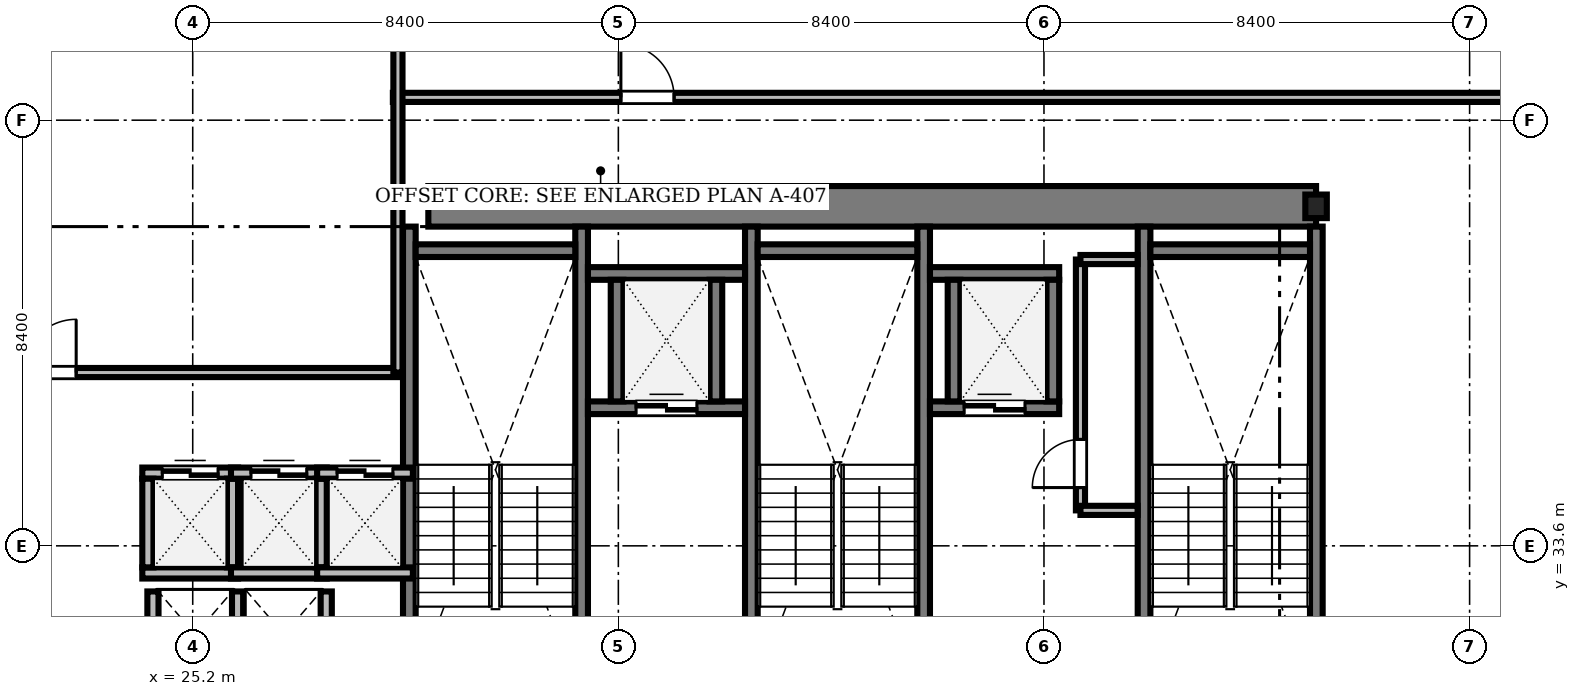
"""IFC4 building model, lengths in metres.
Left out: names, types, materials, properties, quantities, classifications, styles, units other than length and angle.
Written with IfcOpenShell. Run it as: python <this file> out.ifc"""

import sys

from ifc_helpers import new_model, si_unit, direction, frame, frame_2d, origin, origin_2d, place, context, subcontext, project, spatial, rectangle, i_section, extrude, source, transform, mapped, element, fill, save


model = new_model("IFC4")
c1 = context("Model", 3, precision=1e-05, world=origin(), true_north=direction((0.0, 1.0)))
c2 = subcontext(c1, "Body", "Model", "MODEL_VIEW")
j1 = project(units=[si_unit("LENGTHUNIT", "METRE"), si_unit("PLANEANGLEUNIT", "RADIAN")], contexts=[c1])
p1 = place(None, origin())
s1 = spatial("IfcSite", under=j1, at=p1, CompositionType="ELEMENT")
p2 = place(p1, origin())
s2 = spatial("IfcBuilding", under=s1, at=p2, CompositionType="ELEMENT")
p3 = place(p2, frame((0.0, 0.0, 144.6)))
s3 = spatial("IfcBuildingStorey", under=s2, at=p3, CompositionType="ELEMENT", Elevation=144.6)
m1 = source(origin(), c2, "Body", "SweptSolid", [
    extrude(rectangle(XDim=17.52, YDim=0.8, at=frame_2d((8.76, 0.0))), origin(), (0.0, 0.0, 1.0), 3.46),
])
p4 = place(p3, frame((29.85, 40.3, 0.0), z_axis=(0.0, 0.0, 1.0), x_axis=(1.0, 0.0, 0.0)))
e1 = element("IfcWall", 1, at=p4, inside=s3, PredefinedType="SHEAR", context=c2, shape_type="MappedRepresentation", body=[
    mapped(m1, transform((0.0, 0.0, 0.0), scale=1.0)),
])
m2 = source(origin(), c2, "Body", "SweptSolid", [
    extrude(i_section(OverallWidth=0.424, OverallDepth=0.465, WebThickness=0.035, FlangeThickness=0.056, FilletRadius=0.015, at=origin_2d()), origin(), (0.0, 0.0, 1.0), 3.46),
])
p5 = place(p3, frame((47.37, 40.3, 0.0), z_axis=(0.0, 0.0, 1.0), x_axis=(1.0, 0.0, 0.0)))
e2 = element("IfcColumn", 2, at=p5, inside=s3, PredefinedType="COLUMN", context=c2, shape_type="MappedRepresentation", body=[
    mapped(m2, transform((0.0, 0.0, 0.0), scale=1.0)),
])
m3 = source(origin(), c2, "Body", "SweptSolid", [
    extrude(rectangle(XDim=9.25, YDim=0.25, at=frame_2d((4.625, 0.0))), origin(), (0.0, 0.0, 1.0), 3.5),
])
for number, where, z_axis, x_axis in (
    (3, (29.475, 30.65, 0.0), (0.0, 0.0, 1.0), (0.0, 1.0, 0.0)),
    (4, (32.875, 30.65, 0.0), (0.0, 0.0, 1.0), (0.0, 1.0, 0.0)),
):
    element("IfcWall", number, at=place(p3, frame(where, z_axis=z_axis, x_axis=x_axis)), inside=s3, PredefinedType="SOLIDWALL", context=c2, shape_type="MappedRepresentation", body=[
        mapped(m3, transform((0.0, 0.0, 0.0), scale=1.0)),
    ])
m4 = source(origin(), c2, "Body", "SweptSolid", [
    extrude(rectangle(XDim=3.15, YDim=0.25, at=frame_2d((1.575, 0.0))), origin(), (0.0, 0.0, 1.0), 3.5),
])
p6 = place(p3, frame((29.6, 39.425, 0.0), z_axis=(0.0, 0.0, 1.0), x_axis=(1.0, 0.0, 0.0)))
e5 = element("IfcWall", 5, at=p6, inside=s3, PredefinedType="SOLIDWALL", context=c2, shape_type="MappedRepresentation", body=[
    mapped(m4, transform((0.0, 0.0, 0.0), scale=1.0)),
])
for number, where, z_axis, x_axis in (
    (6, (36.225, 30.65, 0.0), (0.0, 0.0, 1.0), (0.0, 1.0, 0.0)),
    (7, (39.625, 30.65, 0.0), (0.0, 0.0, 1.0), (0.0, 1.0, 0.0)),
):
    element("IfcWall", number, at=place(p3, frame(where, z_axis=z_axis, x_axis=x_axis)), inside=s3, PredefinedType="SOLIDWALL", context=c2, shape_type="MappedRepresentation", body=[
        mapped(m3, transform((0.0, 0.0, 0.0), scale=1.0)),
    ])
p7 = place(p3, frame((36.35, 39.425, 0.0), z_axis=(0.0, 0.0, 1.0), x_axis=(1.0, 0.0, 0.0)))
e8 = element("IfcWall", 8, at=p7, inside=s3, PredefinedType="SOLIDWALL", context=c2, shape_type="MappedRepresentation", body=[
    mapped(m4, transform((0.0, 0.0, 0.0), scale=1.0)),
])
for number, where, z_axis, x_axis in (
    (9, (43.975, 30.65, 0.0), (0.0, 0.0, 1.0), (0.0, 1.0, 0.0)),
    (10, (47.375, 30.65, 0.0), (0.0, 0.0, 1.0), (0.0, 1.0, 0.0)),
):
    element("IfcWall", number, at=place(p3, frame(where, z_axis=z_axis, x_axis=x_axis)), inside=s3, PredefinedType="SOLIDWALL", context=c2, shape_type="MappedRepresentation", body=[
        mapped(m3, transform((0.0, 0.0, 0.0), scale=1.0)),
    ])
p8 = place(p3, frame((44.1, 39.425, 0.0), z_axis=(0.0, 0.0, 1.0), x_axis=(1.0, 0.0, 0.0)))
e11 = element("IfcWall", 11, at=p8, inside=s3, PredefinedType="SOLIDWALL", context=c2, shape_type="MappedRepresentation", body=[
    mapped(m4, transform((0.0, 0.0, 0.0), scale=1.0)),
])
m5 = source(origin(), c2, "Body", "SweptSolid", [
    extrude(rectangle(XDim=1.89, YDim=0.22, at=frame_2d((0.945, 0.0))), origin(), (0.0, 0.0, 1.0), 3.46),
])
p9 = place(p3, frame((24.205, 33.065, 0.0), z_axis=(0.0, 0.0, 1.0), x_axis=(1.0, 0.0, 0.0)))
e12 = element("IfcWall", 12, at=p9, inside=s3, PredefinedType="SOLIDWALL", context=c2, shape_type="MappedRepresentation", body=[
    mapped(m5, transform((0.0, 0.0, 0.0), scale=1.0)),
])
p10 = place(p3, frame((24.205, 35.035, 0.0), z_axis=(0.0, 0.0, 1.0), x_axis=(1.0, 0.0, 0.0)))
e13 = element("IfcWall", 13, at=p10, inside=s3, PredefinedType="SOLIDWALL", context=c2, shape_type="MappedRepresentation", body=[
    mapped(m5, transform((0.0, 0.0, 0.0), scale=1.0)),
])
m6 = source(origin(), c2, "Body", "SweptSolid", [
    extrude(rectangle(XDim=1.1, YDim=2.2, at=frame_2d((0.55, 1.1))), frame((0.0, 0.12, 0.0), z_axis=(0.0, -1.0, 0.0), x_axis=(1.0, 0.0, 0.0)), (0.0, 0.0, 1.0), 0.24),
])
p11 = place(p10, frame((0.395, 0.0, 0.0)))
e14 = element("IfcOpeningElement", 14, at=p11, cuts=e13, PredefinedType="OPENING", context=c2, shape_type="MappedRepresentation", body=[
    mapped(m6, transform((0.0, 0.0, 0.0), scale=1.0)),
])
m7 = source(origin(), c2, "Body", "SweptSolid", [
    extrude(rectangle(XDim=1.75, YDim=0.22, at=frame_2d((0.875, 0.0))), origin(), (0.0, 0.0, 1.0), 3.46),
])
for number, where, z_axis, x_axis in (
    (15, (24.315, 33.175, 0.0), (0.0, 0.0, 1.0), (0.0, 1.0, 0.0)),
    (16, (25.985, 33.175, 0.0), (0.0, 0.0, 1.0), (0.0, 1.0, 0.0)),
):
    element("IfcWall", number, at=place(p3, frame(where, z_axis=z_axis, x_axis=x_axis)), inside=s3, PredefinedType="SOLIDWALL", context=c2, shape_type="MappedRepresentation", body=[
        mapped(m7, transform((0.0, 0.0, 0.0), scale=1.0)),
    ])
p12 = place(p3, frame((25.955, 33.065, 0.0), z_axis=(0.0, 0.0, 1.0), x_axis=(1.0, 0.0, 0.0)))
e17 = element("IfcWall", 17, at=p12, inside=s3, PredefinedType="SOLIDWALL", context=c2, shape_type="MappedRepresentation", body=[
    mapped(m5, transform((0.0, 0.0, 0.0), scale=1.0)),
])
p13 = place(p3, frame((25.955, 35.035, 0.0), z_axis=(0.0, 0.0, 1.0), x_axis=(1.0, 0.0, 0.0)))
e18 = element("IfcWall", 18, at=p13, inside=s3, PredefinedType="SOLIDWALL", context=c2, shape_type="MappedRepresentation", body=[
    mapped(m5, transform((0.0, 0.0, 0.0), scale=1.0)),
])
p14 = place(p13, frame((0.395, 0.0, 0.0)))
e19 = element("IfcOpeningElement", 19, at=p14, cuts=e18, PredefinedType="OPENING", context=c2, shape_type="MappedRepresentation", body=[
    mapped(m6, transform((0.0, 0.0, 0.0), scale=1.0)),
])
p15 = place(p3, frame((27.735, 33.175, 0.0), z_axis=(0.0, 0.0, 1.0), x_axis=(0.0, 1.0, 0.0)))
e20 = element("IfcWall", 20, at=p15, inside=s3, PredefinedType="SOLIDWALL", context=c2, shape_type="MappedRepresentation", body=[
    mapped(m7, transform((0.0, 0.0, 0.0), scale=1.0)),
])
p16 = place(p3, frame((27.655, 33.065, 0.0), z_axis=(0.0, 0.0, 1.0), x_axis=(1.0, 0.0, 0.0)))
e21 = element("IfcWall", 21, at=p16, inside=s3, PredefinedType="SOLIDWALL", context=c2, shape_type="MappedRepresentation", body=[
    mapped(m5, transform((0.0, 0.0, 0.0), scale=1.0)),
])
p17 = place(p3, frame((27.655, 35.035, 0.0), z_axis=(0.0, 0.0, 1.0), x_axis=(1.0, 0.0, 0.0)))
e22 = element("IfcWall", 22, at=p17, inside=s3, PredefinedType="SOLIDWALL", context=c2, shape_type="MappedRepresentation", body=[
    mapped(m5, transform((0.0, 0.0, 0.0), scale=1.0)),
])
p18 = place(p17, frame((0.395, 0.0, 0.0)))
e23 = element("IfcOpeningElement", 23, at=p18, cuts=e22, PredefinedType="OPENING", context=c2, shape_type="MappedRepresentation", body=[
    mapped(m6, transform((0.0, 0.0, 0.0), scale=1.0)),
])
m8 = source(origin(), c2, "Body", "SweptSolid", [
    extrude(rectangle(XDim=3.1, YDim=0.25, at=frame_2d((1.55, 0.0))), origin(), (0.0, 0.0, 1.0), 3.46),
])
p19 = place(p3, frame((33.0, 36.325, 0.0), z_axis=(0.0, 0.0, 1.0), x_axis=(1.0, 0.0, 0.0)))
e24 = element("IfcWall", 24, at=p19, inside=s3, PredefinedType="SOLIDWALL", context=c2, shape_type="MappedRepresentation", body=[
    mapped(m8, transform((0.0, 0.0, 0.0), scale=1.0)),
])
m9 = source(origin(), c2, "Body", "SweptSolid", [
    extrude(rectangle(XDim=1.2, YDim=2.25, at=frame_2d((0.6, 1.125))), frame((0.0, 0.135, 0.0), z_axis=(0.0, -1.0, 0.0), x_axis=(1.0, 0.0, 0.0)), (0.0, 0.0, 1.0), 0.27),
])
p20 = place(p19, frame((0.95, 0.0, 0.0)))
e25 = element("IfcOpeningElement", 25, at=p20, cuts=e24, PredefinedType="OPENING", context=c2, shape_type="MappedRepresentation", body=[
    mapped(m9, transform((0.0, 0.0, 0.0), scale=1.0)),
])
p21 = place(p3, frame((33.0, 38.975, 0.0), z_axis=(0.0, 0.0, 1.0), x_axis=(1.0, 0.0, 0.0)))
e26 = element("IfcWall", 26, at=p21, inside=s3, PredefinedType="SOLIDWALL", context=c2, shape_type="MappedRepresentation", body=[
    mapped(m8, transform((0.0, 0.0, 0.0), scale=1.0)),
])
m10 = source(origin(), c2, "Body", "SweptSolid", [
    extrude(rectangle(XDim=2.4, YDim=0.25, at=frame_2d((1.2, 0.0))), origin(), (0.0, 0.0, 1.0), 3.46),
])
for number, where, z_axis, x_axis in (
    (27, (33.575, 36.45, 0.0), (0.0, 0.0, 1.0), (0.0, 1.0, 0.0)),
    (28, (35.525, 36.45, 0.0), (0.0, 0.0, 1.0), (0.0, 1.0, 0.0)),
):
    element("IfcWall", number, at=place(p3, frame(where, z_axis=z_axis, x_axis=x_axis)), inside=s3, PredefinedType="SOLIDWALL", context=c2, shape_type="MappedRepresentation", body=[
        mapped(m10, transform((0.0, 0.0, 0.0), scale=1.0)),
    ])
m11 = source(origin(), c2, "Body", "SweptSolid", [
    extrude(rectangle(XDim=2.55, YDim=0.25, at=frame_2d((1.275, 0.0))), origin(), (0.0, 0.0, 1.0), 3.46),
])
p22 = place(p3, frame((39.75, 36.325, 0.0), z_axis=(0.0, 0.0, 1.0), x_axis=(1.0, 0.0, 0.0)))
e29 = element("IfcWall", 29, at=p22, inside=s3, PredefinedType="SOLIDWALL", context=c2, shape_type="MappedRepresentation", body=[
    mapped(m11, transform((0.0, 0.0, 0.0), scale=1.0)),
])
p23 = place(p22, frame((0.675, 0.0, 0.0)))
e30 = element("IfcOpeningElement", 30, at=p23, cuts=e29, PredefinedType="OPENING", context=c2, shape_type="MappedRepresentation", body=[
    mapped(m9, transform((0.0, 0.0, 0.0), scale=1.0)),
])
p24 = place(p3, frame((39.75, 38.975, 0.0), z_axis=(0.0, 0.0, 1.0), x_axis=(1.0, 0.0, 0.0)))
e31 = element("IfcWall", 31, at=p24, inside=s3, PredefinedType="SOLIDWALL", context=c2, shape_type="MappedRepresentation", body=[
    mapped(m11, transform((0.0, 0.0, 0.0), scale=1.0)),
])
for number, where, z_axis, x_axis in (
    (32, (40.225, 36.45, 0.0), (0.0, 0.0, 1.0), (0.0, 1.0, 0.0)),
    (33, (42.175, 36.45, 0.0), (0.0, 0.0, 1.0), (0.0, 1.0, 0.0)),
):
    element("IfcWall", number, at=place(p3, frame(where, z_axis=z_axis, x_axis=x_axis)), inside=s3, PredefinedType="SOLIDWALL", context=c2, shape_type="MappedRepresentation", body=[
        mapped(m10, transform((0.0, 0.0, 0.0), scale=1.0)),
    ])
m12 = source(origin(), c2, "Body", "SweptSolid", [
    extrude(rectangle(XDim=1.7, YDim=0.22, at=frame_2d((0.85, 0.0))), origin(), (0.0, 0.0, 1.0), 3.46),
])
for number, where, z_axis, x_axis in (
    (34, (24.415, 31.0, 0.0), (0.0, 0.0, 1.0), (0.0, 1.0, 0.0)),
    (35, (26.085, 31.0, 0.0), (0.0, 0.0, 1.0), (0.0, 1.0, 0.0)),
    (36, (27.835, 31.0, 0.0), (0.0, 0.0, 1.0), (0.0, 1.0, 0.0)),
):
    element("IfcWall", number, at=place(p3, frame(where, z_axis=z_axis, x_axis=x_axis)), inside=s3, PredefinedType="SOLIDWALL", context=c2, shape_type="MappedRepresentation", body=[
        mapped(m12, transform((0.0, 0.0, 0.0), scale=1.0)),
    ])
m13 = source(origin(), c2, "Body", "SweptSolid", [
    extrude(rectangle(XDim=23.928, YDim=0.18, at=frame_2d((11.964, 0.0))), origin(), (0.0, 0.0, 1.0), 2.702),
])
p25 = place(p3, frame((29.15, 42.45, 0.0), z_axis=(0.0, 0.0, 1.0), x_axis=(1.0, 0.0, 0.0)))
e37 = element("IfcWall", 37, at=p25, inside=s3, PredefinedType="PARTITIONING", context=c2, shape_type="MappedRepresentation", body=[
    mapped(m13, transform((0.0, 0.0, 0.0), scale=1.0)),
])
m14 = source(origin(), c2, "Body", "SweptSolid", [
    extrude(rectangle(XDim=1.05, YDim=2.2, at=frame_2d((0.525, 1.1))), frame((0.0, 0.1, 0.0), z_axis=(0.0, -1.0, 0.0), x_axis=(1.0, 0.0, 0.0)), (0.0, 0.0, 1.0), 0.2),
])
p26 = place(p25, frame((4.5, 0.0, 0.0)))
e38 = element("IfcOpeningElement", 38, at=p26, cuts=e37, PredefinedType="OPENING", context=c2, shape_type="MappedRepresentation", body=[
    mapped(m14, transform((0.0, 0.0, 0.0), scale=1.0)),
])
m15 = source(origin(), c2, "Body", "SweptSolid", [
    extrude(rectangle(XDim=22.328, YDim=0.18, at=frame_2d((11.164, 0.0))), origin(), (0.0, 0.0, 1.0), 2.702),
])
p27 = place(p3, frame((6.922, 37.02, 0.0), z_axis=(0.0, 0.0, 1.0), x_axis=(1.0, 0.0, 0.0)))
e39 = element("IfcWall", 39, at=p27, inside=s3, PredefinedType="PARTITIONING", context=c2, shape_type="MappedRepresentation", body=[
    mapped(m15, transform((0.0, 0.0, 0.0), scale=1.0)),
])
p28 = place(p27, frame((14.928, 0.0, 0.0)))
e40 = element("IfcOpeningElement", 40, at=p28, cuts=e39, PredefinedType="OPENING", context=c2, shape_type="MappedRepresentation", body=[
    mapped(m14, transform((0.0, 0.0, 0.0), scale=1.0)),
])
m16 = source(origin(), c2, "Body", "SweptSolid", [
    extrude(rectangle(XDim=4.95, YDim=0.18, at=frame_2d((2.475, 0.0))), origin(), (0.0, 0.0, 1.0), 3.46),
])
p29 = place(p3, frame((42.72, 34.3, 0.0), z_axis=(0.0, 0.0, 1.0), x_axis=(0.0, 1.0, 0.0)))
e41 = element("IfcWall", 41, at=p29, inside=s3, PredefinedType="PARTITIONING", context=c2, shape_type="MappedRepresentation", body=[
    mapped(m16, transform((0.0, 0.0, 0.0), scale=1.0)),
])
m17 = source(origin(), c2, "Body", "SweptSolid", [
    extrude(rectangle(XDim=0.95, YDim=2.15, at=frame_2d((0.475, 1.075))), frame((0.0, 0.1, 0.0), z_axis=(0.0, -1.0, 0.0), x_axis=(1.0, 0.0, 0.0)), (0.0, 0.0, 1.0), 0.2),
])
p30 = place(p29, frame((0.45, 0.0, 0.0)))
e42 = element("IfcOpeningElement", 42, at=p30, cuts=e41, PredefinedType="OPENING", context=c2, shape_type="MappedRepresentation", body=[
    mapped(m17, transform((0.0, 0.0, 0.0), scale=1.0)),
])
m18 = source(origin(), c2, "Body", "SweptSolid", [
    extrude(rectangle(XDim=11.45, YDim=0.18, at=frame_2d((5.725, 0.0))), origin(), (0.0, 0.0, 1.0), 2.702),
])
p31 = place(p3, frame((29.25, 37.02, 0.0), z_axis=(0.0, 0.0, 1.0), x_axis=(0.0, 1.0, 0.0)))
e43 = element("IfcWall", 43, at=p31, inside=s3, PredefinedType="PARTITIONING", context=c2, shape_type="MappedRepresentation", body=[
    mapped(m18, transform((0.0, 0.0, 0.0), scale=1.0)),
])
m19 = source(origin(), c2, "Body", "SweptSolid", [
    extrude(rectangle(XDim=1.128, YDim=0.18, at=frame_2d((0.564, 0.0))), origin(), (0.0, 0.0, 1.0), 3.46),
])
for number, where, z_axis, x_axis in (
    (44, (42.72, 34.3, 0.0), (0.0, 0.0, 1.0), (1.0, 0.0, 0.0)),
    (45, (42.72, 39.25, 0.0), (0.0, 0.0, 1.0), (1.0, 0.0, 0.0)),
):
    element("IfcWall", number, at=place(p3, frame(where, z_axis=z_axis, x_axis=x_axis)), inside=s3, PredefinedType="PARTITIONING", context=c2, shape_type="MappedRepresentation", body=[
        mapped(m19, transform((0.0, 0.0, 0.0), scale=1.0)),
    ])
m20 = source(origin(), c2, "Body", "SweptSolid", [
    extrude(rectangle(XDim=1.1, YDim=2.2, at=frame_2d((0.55, 1.1))), frame((0.0, 0.025, 0.0), z_axis=(0.0, -1.0, 0.0), x_axis=(1.0, 0.0, 0.0)), (0.0, 0.0, 1.0), 0.05),
])
p32 = place(p11, origin())
e46 = element("IfcDoor", 46, at=p32, inside=s3, OperationType="DOUBLE_DOOR_SLIDING", PredefinedType="DOOR", context=c2, shape_type="MappedRepresentation", body=[
    mapped(m20, transform((0.0, 0.0, 0.0), scale=1.0)),
])
fill(e14, e46)
p33 = place(p14, origin())
e47 = element("IfcDoor", 47, at=p33, inside=s3, OperationType="DOUBLE_DOOR_SLIDING", PredefinedType="DOOR", context=c2, shape_type="MappedRepresentation", body=[
    mapped(m20, transform((0.0, 0.0, 0.0), scale=1.0)),
])
fill(e19, e47)
p34 = place(p18, origin())
e48 = element("IfcDoor", 48, at=p34, inside=s3, OperationType="DOUBLE_DOOR_SLIDING", PredefinedType="DOOR", context=c2, shape_type="MappedRepresentation", body=[
    mapped(m20, transform((0.0, 0.0, 0.0), scale=1.0)),
])
fill(e23, e48)
m21 = source(origin(), c2, "Body", "SweptSolid", [
    extrude(rectangle(XDim=1.2, YDim=2.25, at=frame_2d((0.6, 1.125))), frame((0.0, 0.025, 0.0), z_axis=(0.0, -1.0, 0.0), x_axis=(1.0, 0.0, 0.0)), (0.0, 0.0, 1.0), 0.05),
])
p35 = place(p20, origin())
e49 = element("IfcDoor", 49, at=p35, inside=s3, OperationType="DOUBLE_DOOR_SLIDING", PredefinedType="DOOR", context=c2, shape_type="MappedRepresentation", body=[
    mapped(m21, transform((0.0, 0.0, 0.0), scale=1.0)),
])
fill(e25, e49)
p36 = place(p23, origin())
e50 = element("IfcDoor", 50, at=p36, inside=s3, OperationType="DOUBLE_DOOR_SLIDING", PredefinedType="DOOR", context=c2, shape_type="MappedRepresentation", body=[
    mapped(m21, transform((0.0, 0.0, 0.0), scale=1.0)),
])
fill(e30, e50)
m22 = source(origin(), c2, "Body", "SweptSolid", [
    extrude(rectangle(XDim=1.05, YDim=2.2, at=frame_2d((0.525, 1.1))), frame((0.0, 0.025, 0.0), z_axis=(0.0, -1.0, 0.0), x_axis=(1.0, 0.0, 0.0)), (0.0, 0.0, 1.0), 0.05),
])
p37 = place(p26, origin())
e51 = element("IfcDoor", 51, at=p37, inside=s3, OperationType="SINGLE_SWING_LEFT", PredefinedType="DOOR", context=c2, shape_type="MappedRepresentation", body=[
    mapped(m22, transform((0.0, 0.0, 0.0), scale=1.0)),
])
fill(e38, e51)
p38 = place(p28, origin())
e52 = element("IfcDoor", 52, at=p38, inside=s3, OperationType="SINGLE_SWING_RIGHT", PredefinedType="DOOR", context=c2, shape_type="MappedRepresentation", body=[
    mapped(m22, transform((0.0, 0.0, 0.0), scale=1.0)),
])
fill(e40, e52)
m23 = source(origin(), c2, "Body", "SweptSolid", [
    extrude(rectangle(XDim=0.95, YDim=2.15, at=frame_2d((0.475, 1.075))), frame((0.0, 0.025, 0.0), z_axis=(0.0, -1.0, 0.0), x_axis=(1.0, 0.0, 0.0)), (0.0, 0.0, 1.0), 0.05),
])
p39 = place(p30, origin())
e53 = element("IfcDoor", 53, at=p39, inside=s3, OperationType="SINGLE_SWING_LEFT", PredefinedType="DOOR", context=c2, shape_type="MappedRepresentation", body=[
    mapped(m23, transform((0.0, 0.0, 0.0), scale=1.0)),
])
fill(e42, e53)
save(model, sys.argv[1])
